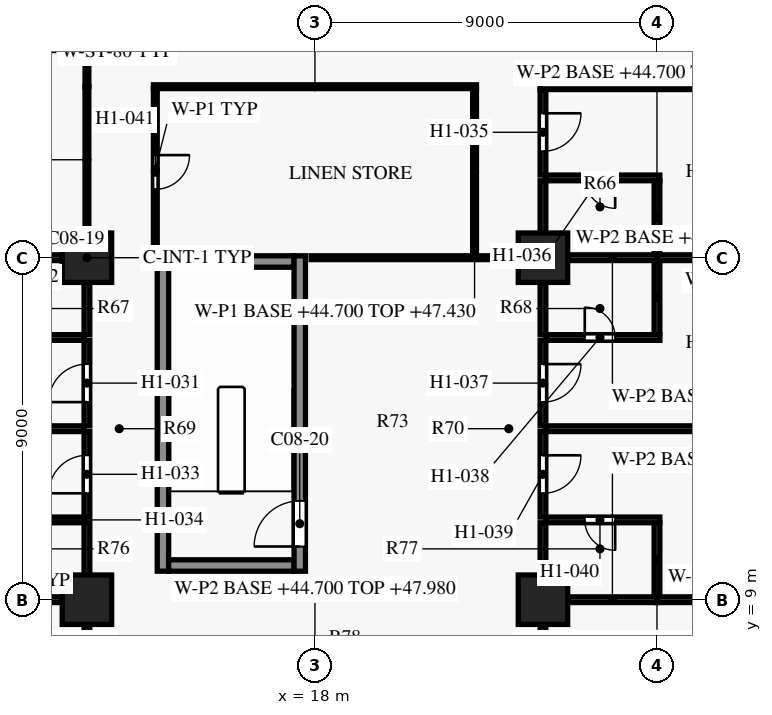
"""IFC4 building model, lengths in metres.
Left out: names, types, materials, properties, quantities, classifications, styles, units other than length and angle.
Written with IfcOpenShell. Run it as: python <this file> out.ifc"""

import sys

from ifc_helpers import new_model, si_unit, direction, frame, frame_2d, origin, origin_2d, place, context, subcontext, project, spatial, rectangle, extrude, element, fill, save


model = new_model("IFC4")
c1 = context("Model", 3, precision=1e-05, world=origin(), true_north=direction((0.0, 1.0)))
c2 = subcontext(c1, "Body", "Model", "MODEL_VIEW")
j1 = project(units=[si_unit("LENGTHUNIT", "METRE"), si_unit("PLANEANGLEUNIT", "RADIAN")], contexts=[c1])
p1 = place(None, origin())
s1 = spatial("IfcSite", under=j1, at=p1, CompositionType="ELEMENT")
p2 = place(p1, origin())
s2 = spatial("IfcBuilding", under=s1, at=p2, CompositionType="ELEMENT")
p3 = place(p2, frame((0.0, 0.0, 44.7)))
s3 = spatial("IfcBuildingStorey", under=s2, at=p3, CompositionType="ELEMENT", Elevation=44.7)
for number, where, z_axis, x_axis in (
    (1, (12.0, 9.0, 0.0), (0.0, 0.0, 1.0), (1.0, 0.0, 0.0)),
    (2, (12.0, 18.0, 0.0), (0.0, 0.0, 1.0), (1.0, 0.0, 0.0)),
    (3, (24.0, 9.0, 0.0), (0.0, 0.0, 1.0), (1.0, 0.0, 0.0)),
    (4, (24.0, 18.0, 0.0), (0.0, 0.0, 1.0), (1.0, 0.0, 0.0)),
):
    element("IfcColumn", number, at=place(p3, frame(where, z_axis=z_axis, x_axis=x_axis)), inside=s3, PredefinedType="COLUMN", context=c2, shape_type="SweptSolid", body=[
        extrude(rectangle(XDim=1.3, YDim=1.3, at=origin_2d()), origin(), (0.0, 0.0, 1.0), 3.6),
    ])
for number, where, z_axis, x_axis in (
    (5, (14.15, 9.9, 0.0), (0.0, 0.0, 1.0), (1.0, 0.0, 0.0)),
    (6, (14.15, 17.9, 0.0), (0.0, 0.0, 1.0), (1.0, 0.0, 0.0)),
):
    element("IfcWall", number, at=place(p3, frame(where, z_axis=z_axis, x_axis=x_axis)), inside=s3, PredefinedType="SHEAR", context=c2, shape_type="SweptSolid", body=[
        extrude(rectangle(XDim=3.3, YDim=0.3, at=frame_2d((1.65, 0.0))), origin(), (0.0, 0.0, 1.0), 3.3),
    ])
p4 = place(p3, frame((14.0, 9.75, 0.0), z_axis=(0.0, 0.0, 1.0), x_axis=(0.0, 1.0, 0.0)))
e7 = element("IfcWall", 7, at=p4, inside=s3, PredefinedType="SHEAR", context=c2, shape_type="SweptSolid", body=[
    extrude(rectangle(XDim=8.3, YDim=0.3, at=frame_2d((4.15, 0.0))), origin(), (0.0, 0.0, 1.0), 3.3),
])
p5 = place(p3, frame((17.6, 9.75, 0.0), z_axis=(0.0, 0.0, 1.0), x_axis=(0.0, 1.0, 0.0)))
e8 = element("IfcWall", 8, at=p5, inside=s3, PredefinedType="SHEAR", context=c2, shape_type="SweptSolid", body=[
    extrude(rectangle(XDim=8.3, YDim=0.3, at=frame_2d((4.15, 0.0))), origin(), (0.0, 0.0, 1.0), 3.3),
])
p6 = place(p5, frame((0.65, 0.0, 0.0)))
e9 = element("IfcOpeningElement", 9, at=p6, cuts=e8, PredefinedType="OPENING", context=c2, shape_type="SweptSolid", body=[
    extrude(rectangle(XDim=1.2, YDim=2.2, at=frame_2d((0.6, 1.1))), frame((0.0, 0.16, 0.0), z_axis=(0.0, -1.0, 0.0), x_axis=(1.0, 0.0, 0.0)), (0.0, 0.0, 1.0), 0.32),
])
for number, where, z_axis, x_axis in (
    (10, (12.0, 7.275, 0.0), (0.0, 0.0, 1.0), (0.0, 1.0, 0.0)),
    (11, (24.0, 8.345, 0.0), (0.0, 0.0, 1.0), (0.0, -1.0, 0.0)),
):
    element("IfcWall", number, at=place(p3, frame(where, z_axis=z_axis, x_axis=x_axis)), inside=s3, PredefinedType="PARTITIONING", context=c2, shape_type="SweptSolid", body=[
        extrude(rectangle(XDim=1.07, YDim=0.15, at=frame_2d((0.535, 0.0))), origin(), (0.0, 0.0, 1.0), 2.58),
    ])
for number, where, z_axis, x_axis in (
    (12, (11.345, 9.0, 0.0), (0.0, 0.0, 1.0), (-1.0, 0.0, 0.0)),
    (13, (27.0, 9.0, 0.0), (0.0, 0.0, 1.0), (-1.0, 0.0, 0.0)),
):
    element("IfcWall", number, at=place(p3, frame(where, z_axis=z_axis, x_axis=x_axis)), inside=s3, PredefinedType="PARTITIONING", context=c2, shape_type="SweptSolid", body=[
        extrude(rectangle(XDim=2.345, YDim=0.15, at=frame_2d((1.172, 0.0))), origin(), (0.0, 0.0, 1.0), 2.73),
    ])
p7 = place(p3, frame((34.975, 9.0, 0.0), z_axis=(0.0, 0.0, 1.0), x_axis=(-1.0, 0.0, 0.0)))
e14 = element("IfcWall", 14, at=p7, inside=s3, PredefinedType="PARTITIONING", context=c2, shape_type="SweptSolid", body=[
    extrude(rectangle(XDim=7.975, YDim=0.15, at=frame_2d((3.988, 0.0))), origin(), (0.0, 0.0, 1.0), 2.73),
])
p8 = place(p3, frame((27.0, 9.075, 0.0), z_axis=(0.0, 0.0, 1.0), x_axis=(0.0, 1.0, 0.0)))
e15 = element("IfcWall", 15, at=p8, inside=s3, PredefinedType="PARTITIONING", context=c2, shape_type="SweptSolid", body=[
    extrude(rectangle(XDim=1.95, YDim=0.15, at=frame_2d((0.975, 0.0))), origin(), (0.0, 0.0, 1.0), 2.73),
])
for number, where, z_axis, x_axis in (
    (16, (12.0, 9.655, 0.0), (0.0, 0.0, 1.0), (0.0, 1.0, 0.0)),
    (17, (24.0, 11.025, 0.0), (0.0, 0.0, 1.0), (0.0, -1.0, 0.0)),
):
    element("IfcWall", number, at=place(p3, frame(where, z_axis=z_axis, x_axis=x_axis)), inside=s3, PredefinedType="PARTITIONING", context=c2, shape_type="SweptSolid", body=[
        extrude(rectangle(XDim=1.37, YDim=0.15, at=frame_2d((0.685, 0.0))), origin(), (0.0, 0.0, 1.0), 2.58),
    ])
p9 = place(p3, frame((11.925, 11.1, 0.0), z_axis=(0.0, 0.0, 1.0), x_axis=(-1.0, 0.0, 0.0)))
e18 = element("IfcWall", 18, at=p9, inside=s3, PredefinedType="PARTITIONING", context=c2, shape_type="SweptSolid", body=[
    extrude(rectangle(XDim=3.0, YDim=0.15, at=frame_2d((1.5, 0.0))), origin(), (0.0, 0.0, 1.0), 2.58),
])
p10 = place(p9, frame((1.025, 0.0, 0.0)))
e19 = element("IfcOpeningElement", 19, at=p10, cuts=e18, PredefinedType="OPENING", context=c2, shape_type="SweptSolid", body=[
    extrude(rectangle(XDim=0.8, YDim=2.1, at=frame_2d((0.4, 1.05))), frame((0.0, 0.085, 0.0), z_axis=(0.0, -1.0, 0.0), x_axis=(1.0, 0.0, 0.0)), (0.0, 0.0, 1.0), 0.17),
])
p11 = place(p3, frame((27.075, 11.1, 0.0), z_axis=(0.0, 0.0, 1.0), x_axis=(-1.0, 0.0, 0.0)))
e20 = element("IfcWall", 20, at=p11, inside=s3, PredefinedType="PARTITIONING", context=c2, shape_type="SweptSolid", body=[
    extrude(rectangle(XDim=3.0, YDim=0.15, at=frame_2d((1.5, 0.0))), origin(), (0.0, 0.0, 1.0), 2.58),
])
p12 = place(p11, frame((1.175, 0.0, 0.0)))
e21 = element("IfcOpeningElement", 21, at=p12, cuts=e20, PredefinedType="OPENING", context=c2, shape_type="SweptSolid", body=[
    extrude(rectangle(XDim=0.8, YDim=2.1, at=frame_2d((0.4, 1.05))), frame((0.0, 0.085, 0.0), z_axis=(0.0, -1.0, 0.0), x_axis=(1.0, 0.0, 0.0)), (0.0, 0.0, 1.0), 0.17),
])
p13 = place(p3, frame((12.0, 11.175, 0.0), z_axis=(0.0, 0.0, 1.0), x_axis=(0.0, 1.0, 0.0)))
e22 = element("IfcWall", 22, at=p13, inside=s3, PredefinedType="PARTITIONING", context=c2, shape_type="SweptSolid", body=[
    extrude(rectangle(XDim=2.25, YDim=0.15, at=frame_2d((1.125, 0.0))), origin(), (0.0, 0.0, 1.0), 2.58),
])
p14 = place(p13, frame((0.625, 0.0, 0.0)))
e23 = element("IfcOpeningElement", 23, at=p14, cuts=e22, PredefinedType="OPENING", context=c2, shape_type="SweptSolid", body=[
    extrude(rectangle(XDim=1.0, YDim=2.1, at=frame_2d((0.5, 1.05))), frame((0.0, 0.085, 0.0), z_axis=(0.0, -1.0, 0.0), x_axis=(1.0, 0.0, 0.0)), (0.0, 0.0, 1.0), 0.17),
])
p15 = place(p3, frame((24.0, 13.425, 0.0), z_axis=(0.0, 0.0, 1.0), x_axis=(0.0, -1.0, 0.0)))
e24 = element("IfcWall", 24, at=p15, inside=s3, PredefinedType="PARTITIONING", context=c2, shape_type="SweptSolid", body=[
    extrude(rectangle(XDim=2.25, YDim=0.15, at=frame_2d((1.125, 0.0))), origin(), (0.0, 0.0, 1.0), 2.58),
])
p16 = place(p15, frame((0.625, 0.0, 0.0)))
e25 = element("IfcOpeningElement", 25, at=p16, cuts=e24, PredefinedType="OPENING", context=c2, shape_type="SweptSolid", body=[
    extrude(rectangle(XDim=1.0, YDim=2.1, at=frame_2d((0.5, 1.05))), frame((0.0, 0.085, 0.0), z_axis=(0.0, -1.0, 0.0), x_axis=(1.0, 0.0, 0.0)), (0.0, 0.0, 1.0), 0.17),
])
for number, where, z_axis, x_axis in (
    (26, (11.925, 13.5, 0.0), (0.0, 0.0, 1.0), (-1.0, 0.0, 0.0)),
    (27, (35.425, 13.5, 0.0), (0.0, 0.0, 1.0), (-1.0, 0.0, 0.0)),
):
    element("IfcWall", number, at=place(p3, frame(where, z_axis=z_axis, x_axis=x_axis)), inside=s3, PredefinedType="PARTITIONING", context=c2, shape_type="SweptSolid", body=[
        extrude(rectangle(XDim=11.35, YDim=0.15, at=frame_2d((5.675, 0.0))), origin(), (0.0, 0.0, 1.0), 2.58),
    ])
p17 = place(p3, frame((12.0, 13.575, 0.0), z_axis=(0.0, 0.0, 1.0), x_axis=(0.0, 1.0, 0.0)))
e28 = element("IfcWall", 28, at=p17, inside=s3, PredefinedType="PARTITIONING", context=c2, shape_type="SweptSolid", body=[
    extrude(rectangle(XDim=2.25, YDim=0.15, at=frame_2d((1.125, 0.0))), origin(), (0.0, 0.0, 1.0), 2.58),
])
p18 = place(p17, frame((0.625, 0.0, 0.0)))
e29 = element("IfcOpeningElement", 29, at=p18, cuts=e28, PredefinedType="OPENING", context=c2, shape_type="SweptSolid", body=[
    extrude(rectangle(XDim=1.0, YDim=2.1, at=frame_2d((0.5, 1.05))), frame((0.0, 0.085, 0.0), z_axis=(0.0, -1.0, 0.0), x_axis=(1.0, 0.0, 0.0)), (0.0, 0.0, 1.0), 0.17),
])
p19 = place(p3, frame((24.0, 15.825, 0.0), z_axis=(0.0, 0.0, 1.0), x_axis=(0.0, -1.0, 0.0)))
e30 = element("IfcWall", 30, at=p19, inside=s3, PredefinedType="PARTITIONING", context=c2, shape_type="SweptSolid", body=[
    extrude(rectangle(XDim=2.25, YDim=0.15, at=frame_2d((1.125, 0.0))), origin(), (0.0, 0.0, 1.0), 2.58),
])
p20 = place(p19, frame((0.625, 0.0, 0.0)))
e31 = element("IfcOpeningElement", 31, at=p20, cuts=e30, PredefinedType="OPENING", context=c2, shape_type="SweptSolid", body=[
    extrude(rectangle(XDim=1.0, YDim=2.1, at=frame_2d((0.5, 1.05))), frame((0.0, 0.085, 0.0), z_axis=(0.0, -1.0, 0.0), x_axis=(1.0, 0.0, 0.0)), (0.0, 0.0, 1.0), 0.17),
])
p21 = place(p3, frame((8.925, 15.9, 0.0), z_axis=(0.0, 0.0, 1.0), x_axis=(1.0, 0.0, 0.0)))
e32 = element("IfcWall", 32, at=p21, inside=s3, PredefinedType="PARTITIONING", context=c2, shape_type="SweptSolid", body=[
    extrude(rectangle(XDim=3.0, YDim=0.15, at=frame_2d((1.5, 0.0))), origin(), (0.0, 0.0, 1.0), 2.58),
])
p22 = place(p21, frame((1.175, 0.0, 0.0)))
e33 = element("IfcOpeningElement", 33, at=p22, cuts=e32, PredefinedType="OPENING", context=c2, shape_type="SweptSolid", body=[
    extrude(rectangle(XDim=0.8, YDim=2.1, at=frame_2d((0.4, 1.05))), frame((0.0, 0.085, 0.0), z_axis=(0.0, -1.0, 0.0), x_axis=(1.0, 0.0, 0.0)), (0.0, 0.0, 1.0), 0.17),
])
p23 = place(p3, frame((24.075, 15.9, 0.0), z_axis=(0.0, 0.0, 1.0), x_axis=(1.0, 0.0, 0.0)))
e34 = element("IfcWall", 34, at=p23, inside=s3, PredefinedType="PARTITIONING", context=c2, shape_type="SweptSolid", body=[
    extrude(rectangle(XDim=3.0, YDim=0.15, at=frame_2d((1.5, 0.0))), origin(), (0.0, 0.0, 1.0), 2.58),
])
p24 = place(p23, frame((1.025, 0.0, 0.0)))
e35 = element("IfcOpeningElement", 35, at=p24, cuts=e34, PredefinedType="OPENING", context=c2, shape_type="SweptSolid", body=[
    extrude(rectangle(XDim=0.8, YDim=2.1, at=frame_2d((0.4, 1.05))), frame((0.0, 0.085, 0.0), z_axis=(0.0, -1.0, 0.0), x_axis=(1.0, 0.0, 0.0)), (0.0, 0.0, 1.0), 0.17),
])
p25 = place(p3, frame((12.0, 15.975, 0.0), z_axis=(0.0, 0.0, 1.0), x_axis=(0.0, 1.0, 0.0)))
e36 = element("IfcWall", 36, at=p25, inside=s3, PredefinedType="PARTITIONING", context=c2, shape_type="SweptSolid", body=[
    extrude(rectangle(XDim=1.37, YDim=0.15, at=frame_2d((0.685, 0.0))), origin(), (0.0, 0.0, 1.0), 2.58),
])
p26 = place(p3, frame((27.0, 15.975, 0.0), z_axis=(0.0, 0.0, 1.0), x_axis=(0.0, 1.0, 0.0)))
e37 = element("IfcWall", 37, at=p26, inside=s3, PredefinedType="PARTITIONING", context=c2, shape_type="SweptSolid", body=[
    extrude(rectangle(XDim=1.95, YDim=0.15, at=frame_2d((0.975, 0.0))), origin(), (0.0, 0.0, 1.0), 2.73),
])
p27 = place(p3, frame((24.0, 17.345, 0.0), z_axis=(0.0, 0.0, 1.0), x_axis=(0.0, -1.0, 0.0)))
e38 = element("IfcWall", 38, at=p27, inside=s3, PredefinedType="PARTITIONING", context=c2, shape_type="SweptSolid", body=[
    extrude(rectangle(XDim=1.37, YDim=0.15, at=frame_2d((0.685, 0.0))), origin(), (0.0, 0.0, 1.0), 2.58),
])
p28 = place(p3, frame((11.345, 18.0, 0.0), z_axis=(0.0, 0.0, 1.0), x_axis=(-1.0, 0.0, 0.0)))
e39 = element("IfcWall", 39, at=p28, inside=s3, PredefinedType="PARTITIONING", context=c2, shape_type="SweptSolid", body=[
    extrude(rectangle(XDim=2.345, YDim=0.15, at=frame_2d((1.172, 0.0))), origin(), (0.0, 0.0, 1.0), 2.73),
])
p29 = place(p3, frame((23.33, 18.0, 0.0), z_axis=(0.0, 0.0, 1.0), x_axis=(-1.0, 0.0, 0.0)))
e40 = element("IfcWall", 40, at=p29, inside=s3, PredefinedType="PARTITIONING", context=c2, shape_type="SweptSolid", body=[
    extrude(rectangle(XDim=5.43, YDim=0.1, at=frame_2d((2.715, 0.0))), origin(), (0.0, 0.0, 1.0), 2.73),
])
p30 = place(p3, frame((27.0, 18.0, 0.0), z_axis=(0.0, 0.0, 1.0), x_axis=(-1.0, 0.0, 0.0)))
e41 = element("IfcWall", 41, at=p30, inside=s3, PredefinedType="PARTITIONING", context=c2, shape_type="SweptSolid", body=[
    extrude(rectangle(XDim=2.345, YDim=0.15, at=frame_2d((1.172, 0.0))), origin(), (0.0, 0.0, 1.0), 2.73),
])
p31 = place(p3, frame((35.875, 18.0, 0.0), z_axis=(0.0, 0.0, 1.0), x_axis=(-1.0, 0.0, 0.0)))
e42 = element("IfcWall", 42, at=p31, inside=s3, PredefinedType="PARTITIONING", context=c2, shape_type="SweptSolid", body=[
    extrude(rectangle(XDim=8.875, YDim=0.15, at=frame_2d((4.438, 0.0))), origin(), (0.0, 0.0, 1.0), 2.73),
])
p32 = place(p3, frame((22.2, 18.05, 0.0), z_axis=(0.0, 0.0, 1.0), x_axis=(0.0, 1.0, 0.0)))
e43 = element("IfcWall", 43, at=p32, inside=s3, PredefinedType="PARTITIONING", context=c2, shape_type="SweptSolid", body=[
    extrude(rectangle(XDim=4.4, YDim=0.1, at=frame_2d((2.2, 0.0))), origin(), (0.0, 0.0, 1.0), 2.73),
])
p33 = place(p3, frame((27.0, 18.075, 0.0), z_axis=(0.0, 0.0, 1.0), x_axis=(0.0, 1.0, 0.0)))
e44 = element("IfcWall", 44, at=p33, inside=s3, PredefinedType="PARTITIONING", context=c2, shape_type="SweptSolid", body=[
    extrude(rectangle(XDim=1.95, YDim=0.15, at=frame_2d((0.975, 0.0))), origin(), (0.0, 0.0, 1.0), 2.73),
])
p34 = place(p3, frame((24.0, 20.025, 0.0), z_axis=(0.0, 0.0, 1.0), x_axis=(0.0, -1.0, 0.0)))
e45 = element("IfcWall", 45, at=p34, inside=s3, PredefinedType="PARTITIONING", context=c2, shape_type="SweptSolid", body=[
    extrude(rectangle(XDim=1.37, YDim=0.15, at=frame_2d((0.685, 0.0))), origin(), (0.0, 0.0, 1.0), 2.58),
])
p35 = place(p3, frame((27.075, 20.1, 0.0), z_axis=(0.0, 0.0, 1.0), x_axis=(-1.0, 0.0, 0.0)))
e46 = element("IfcWall", 46, at=p35, inside=s3, PredefinedType="PARTITIONING", context=c2, shape_type="SweptSolid", body=[
    extrude(rectangle(XDim=3.0, YDim=0.15, at=frame_2d((1.5, 0.0))), origin(), (0.0, 0.0, 1.0), 2.58),
])
p36 = place(p35, frame((1.175, 0.0, 0.0)))
e47 = element("IfcOpeningElement", 47, at=p36, cuts=e46, PredefinedType="OPENING", context=c2, shape_type="SweptSolid", body=[
    extrude(rectangle(XDim=0.8, YDim=2.1, at=frame_2d((0.4, 1.05))), frame((0.0, 0.085, 0.0), z_axis=(0.0, -1.0, 0.0), x_axis=(1.0, 0.0, 0.0)), (0.0, 0.0, 1.0), 0.17),
])
p37 = place(p3, frame((24.0, 22.425, 0.0), z_axis=(0.0, 0.0, 1.0), x_axis=(0.0, -1.0, 0.0)))
e48 = element("IfcWall", 48, at=p37, inside=s3, PredefinedType="PARTITIONING", context=c2, shape_type="SweptSolid", body=[
    extrude(rectangle(XDim=2.25, YDim=0.15, at=frame_2d((1.125, 0.0))), origin(), (0.0, 0.0, 1.0), 2.58),
])
p38 = place(p37, frame((0.625, 0.0, 0.0)))
e49 = element("IfcOpeningElement", 49, at=p38, cuts=e48, PredefinedType="OPENING", context=c2, shape_type="SweptSolid", body=[
    extrude(rectangle(XDim=1.0, YDim=2.1, at=frame_2d((0.5, 1.05))), frame((0.0, 0.085, 0.0), z_axis=(0.0, -1.0, 0.0), x_axis=(1.0, 0.0, 0.0)), (0.0, 0.0, 1.0), 0.17),
])
p39 = place(p3, frame((13.8, 22.45, 0.0), z_axis=(0.0, 0.0, 1.0), x_axis=(0.0, -1.0, 0.0)))
e50 = element("IfcWall", 50, at=p39, inside=s3, PredefinedType="PARTITIONING", context=c2, shape_type="SweptSolid", body=[
    extrude(rectangle(XDim=4.25, YDim=0.1, at=frame_2d((2.125, 0.0))), origin(), (0.0, 0.0, 1.0), 3.28),
])
p40 = place(p39, frame((1.75, 0.0, 0.0)))
e51 = element("IfcOpeningElement", 51, at=p40, cuts=e50, PredefinedType="OPENING", context=c2, shape_type="SweptSolid", body=[
    extrude(rectangle(XDim=0.9, YDim=2.1, at=frame_2d((0.45, 1.05))), frame((0.0, 0.06, 0.0), z_axis=(0.0, -1.0, 0.0), x_axis=(1.0, 0.0, 0.0)), (0.0, 0.0, 1.0), 0.12),
])
p41 = place(p3, frame((12.0, 22.5, 0.0), z_axis=(0.0, 0.0, 1.0), x_axis=(0.0, -1.0, 0.0)))
e52 = element("IfcWall", 52, at=p41, inside=s3, PredefinedType="PARTITIONING", context=c2, shape_type="SweptSolid", body=[
    extrude(rectangle(XDim=3.845, YDim=0.1, at=frame_2d((1.922, 0.0))), origin(), (0.0, 0.0, 1.0), 2.58),
])
p42 = place(p3, frame((12.0, 26.345, 0.0), z_axis=(0.0, 0.0, 1.0), x_axis=(0.0, -1.0, 0.0)))
e53 = element("IfcWall", 53, at=p42, inside=s3, PredefinedType="PARTITIONING", context=c2, shape_type="SweptSolid", body=[
    extrude(rectangle(XDim=3.845, YDim=0.1, at=frame_2d((1.922, 0.0))), origin(), (0.0, 0.0, 1.0), 2.58),
])
p43 = place(p42, frame((1.145, 0.0, 0.0)))
e54 = element("IfcOpeningElement", 54, at=p43, cuts=e53, PredefinedType="OPENING", context=c2, shape_type="SweptSolid", body=[
    extrude(rectangle(XDim=0.9, YDim=2.1, at=frame_2d((0.45, 1.05))), frame((0.0, 0.06, 0.0), z_axis=(0.0, -1.0, 0.0), x_axis=(1.0, 0.0, 0.0)), (0.0, 0.0, 1.0), 0.12),
])
p44 = place(p3, frame((22.25, 22.5, 0.0), z_axis=(0.0, 0.0, 1.0), x_axis=(-1.0, 0.0, 0.0)))
e55 = element("IfcWall", 55, at=p44, inside=s3, PredefinedType="PARTITIONING", context=c2, shape_type="SweptSolid", body=[
    extrude(rectangle(XDim=8.5, YDim=0.1, at=frame_2d((4.25, 0.0))), origin(), (0.0, 0.0, 1.0), 2.58),
])
p45 = place(p3, frame((35.425, 22.5, 0.0), z_axis=(0.0, 0.0, 1.0), x_axis=(-1.0, 0.0, 0.0)))
e56 = element("IfcWall", 56, at=p45, inside=s3, PredefinedType="PARTITIONING", context=c2, shape_type="SweptSolid", body=[
    extrude(rectangle(XDim=11.5, YDim=0.15, at=frame_2d((5.75, 0.0))), origin(), (0.0, 0.0, 1.0), 2.58),
])
p46 = place(p6, origin())
e57 = element("IfcDoor", 57, at=p46, inside=s3, OperationType="SINGLE_SWING_LEFT", PredefinedType="DOOR", context=c2, shape_type="SweptSolid", body=[
    extrude(rectangle(XDim=1.2, YDim=2.2, at=frame_2d((0.6, 1.1))), frame((0.0, 0.025, 0.0), z_axis=(0.0, -1.0, 0.0), x_axis=(1.0, 0.0, 0.0)), (0.0, 0.0, 1.0), 0.05),
])
fill(e9, e57)
p47 = place(p18, origin())
e58 = element("IfcDoor", 58, at=p47, inside=s3, OperationType="SINGLE_SWING_LEFT", PredefinedType="DOOR", context=c2, shape_type="SweptSolid", body=[
    extrude(rectangle(XDim=1.0, YDim=2.1, at=frame_2d((0.5, 1.05))), frame((0.0, 0.025, 0.0), z_axis=(0.0, -1.0, 0.0), x_axis=(1.0, 0.0, 0.0)), (0.0, 0.0, 1.0), 0.05),
])
fill(e29, e58)
p48 = place(p14, origin())
e59 = element("IfcDoor", 59, at=p48, inside=s3, OperationType="SINGLE_SWING_LEFT", PredefinedType="DOOR", context=c2, shape_type="SweptSolid", body=[
    extrude(rectangle(XDim=1.0, YDim=2.1, at=frame_2d((0.5, 1.05))), frame((0.0, 0.025, 0.0), z_axis=(0.0, -1.0, 0.0), x_axis=(1.0, 0.0, 0.0)), (0.0, 0.0, 1.0), 0.05),
])
fill(e23, e59)
p49 = place(p38, origin())
e60 = element("IfcDoor", 60, at=p49, inside=s3, OperationType="SINGLE_SWING_LEFT", PredefinedType="DOOR", context=c2, shape_type="SweptSolid", body=[
    extrude(rectangle(XDim=1.0, YDim=2.1, at=frame_2d((0.5, 1.05))), frame((0.0, 0.025, 0.0), z_axis=(0.0, -1.0, 0.0), x_axis=(1.0, 0.0, 0.0)), (0.0, 0.0, 1.0), 0.05),
])
fill(e49, e60)
p50 = place(p36, origin())
e61 = element("IfcDoor", 61, at=p50, inside=s3, OperationType="SINGLE_SWING_LEFT", PredefinedType="DOOR", context=c2, shape_type="SweptSolid", body=[
    extrude(rectangle(XDim=0.8, YDim=2.1, at=frame_2d((0.4, 1.05))), frame((0.0, 0.025, 0.0), z_axis=(0.0, -1.0, 0.0), x_axis=(1.0, 0.0, 0.0)), (0.0, 0.0, 1.0), 0.05),
])
fill(e47, e61)
p51 = place(p20, origin())
e62 = element("IfcDoor", 62, at=p51, inside=s3, OperationType="SINGLE_SWING_LEFT", PredefinedType="DOOR", context=c2, shape_type="SweptSolid", body=[
    extrude(rectangle(XDim=1.0, YDim=2.1, at=frame_2d((0.5, 1.05))), frame((0.0, 0.025, 0.0), z_axis=(0.0, -1.0, 0.0), x_axis=(1.0, 0.0, 0.0)), (0.0, 0.0, 1.0), 0.05),
])
fill(e31, e62)
p52 = place(p24, origin())
e63 = element("IfcDoor", 63, at=p52, inside=s3, OperationType="SINGLE_SWING_LEFT", PredefinedType="DOOR", context=c2, shape_type="SweptSolid", body=[
    extrude(rectangle(XDim=0.8, YDim=2.1, at=frame_2d((0.4, 1.05))), frame((0.0, 0.025, 0.0), z_axis=(0.0, -1.0, 0.0), x_axis=(1.0, 0.0, 0.0)), (0.0, 0.0, 1.0), 0.05),
])
fill(e35, e63)
p53 = place(p16, origin())
e64 = element("IfcDoor", 64, at=p53, inside=s3, OperationType="SINGLE_SWING_LEFT", PredefinedType="DOOR", context=c2, shape_type="SweptSolid", body=[
    extrude(rectangle(XDim=1.0, YDim=2.1, at=frame_2d((0.5, 1.05))), frame((0.0, 0.025, 0.0), z_axis=(0.0, -1.0, 0.0), x_axis=(1.0, 0.0, 0.0)), (0.0, 0.0, 1.0), 0.05),
])
fill(e25, e64)
p54 = place(p12, origin())
e65 = element("IfcDoor", 65, at=p54, inside=s3, OperationType="SINGLE_SWING_LEFT", PredefinedType="DOOR", context=c2, shape_type="SweptSolid", body=[
    extrude(rectangle(XDim=0.8, YDim=2.1, at=frame_2d((0.4, 1.05))), frame((0.0, 0.025, 0.0), z_axis=(0.0, -1.0, 0.0), x_axis=(1.0, 0.0, 0.0)), (0.0, 0.0, 1.0), 0.05),
])
fill(e21, e65)
p55 = place(p40, origin())
e66 = element("IfcDoor", 66, at=p55, inside=s3, OperationType="SINGLE_SWING_LEFT", PredefinedType="DOOR", context=c2, shape_type="SweptSolid", body=[
    extrude(rectangle(XDim=0.9, YDim=2.1, at=frame_2d((0.45, 1.05))), frame((0.0, 0.025, 0.0), z_axis=(0.0, -1.0, 0.0), x_axis=(1.0, 0.0, 0.0)), (0.0, 0.0, 1.0), 0.05),
])
fill(e51, e66)
save(model, sys.argv[1])
